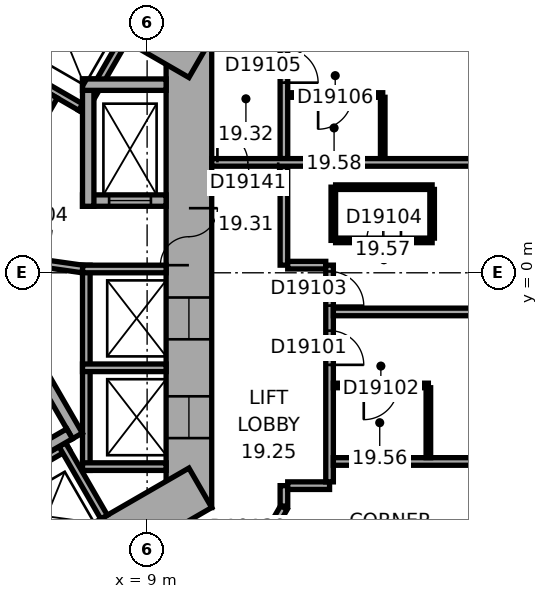
"""IFC4 building model, lengths in metres.
Left out: names, types, materials, properties, quantities, classifications, styles, units other than length and angle.
Written with IfcOpenShell. Run it as: python <this file> out.ifc"""

import sys

from ifc_helpers import new_model, si_unit, direction, frame, frame_2d, origin, place, context, subcontext, project, spatial, rectangle, extrude, element, fill, save


model = new_model("IFC4")
c1 = context("Model", 3, precision=1e-05, world=origin(), true_north=direction((0.0, 1.0)))
c2 = subcontext(c1, "Body", "Model", "MODEL_VIEW")
j1 = project(units=[si_unit("LENGTHUNIT", "METRE"), si_unit("PLANEANGLEUNIT", "RADIAN")], contexts=[c1])
p1 = place(None, origin())
s1 = spatial("IfcSite", under=j1, at=p1, CompositionType="ELEMENT")
p2 = place(p1, origin())
s2 = spatial("IfcBuilding", under=s1, at=p2, CompositionType="ELEMENT")
p3 = place(p2, frame((0.0, 0.0, 86.9)))
s3 = spatial("IfcBuildingStorey", under=s2, at=p3, CompositionType="ELEMENT", Elevation=86.9)
p4 = place(p3, frame((10.1, -6.177, 0.0), z_axis=(0.0, 0.0, 1.0), x_axis=(0.0, 1.0, 0.0)))
e1 = element("IfcWall", 1, at=p4, inside=s3, PredefinedType="SHEAR", context=c2, shape_type="SweptSolid", body=[
    extrude(rectangle(XDim=12.355, YDim=1.2, at=frame_2d((6.177, 0.0))), origin(), (0.0, 0.0, 1.0), 3.3),
])
p5 = place(p4, frame((6.378, 0.0, 0.0)))
e2 = element("IfcOpeningElement", 2, at=p5, cuts=e1, PredefinedType="OPENING", context=c2, shape_type="SweptSolid", body=[
    extrude(rectangle(XDim=1.5, YDim=2.1, at=frame_2d((0.75, 1.05))), frame((0.0, 0.61, 0.0), z_axis=(0.0, -1.0, 0.0), x_axis=(1.0, 0.0, 0.0)), (0.0, 0.0, 1.0), 1.22),
])
p6 = place(p4, frame((1.828, 0.0, 0.0)))
e3 = element("IfcOpeningElement", 3, at=p6, cuts=e1, PredefinedType="OPENING", context=c2, shape_type="SweptSolid", body=[
    extrude(rectangle(XDim=1.1, YDim=2.1, at=frame_2d((0.55, 1.05))), frame((0.0, 0.61, 0.0), z_axis=(0.0, -1.0, 0.0), x_axis=(1.0, 0.0, 0.0)), (0.0, 0.0, 1.0), 1.22),
])
p7 = place(p4, frame((4.427, 0.0, 0.0)))
e4 = element("IfcOpeningElement", 4, at=p7, cuts=e1, PredefinedType="OPENING", context=c2, shape_type="SweptSolid", body=[
    extrude(rectangle(XDim=1.1, YDim=2.1, at=frame_2d((0.55, 1.05))), frame((0.0, 0.61, 0.0), z_axis=(0.0, -1.0, 0.0), x_axis=(1.0, 0.0, 0.0)), (0.0, 0.0, 1.0), 1.22),
])
p8 = place(p3, frame((10.4, 5.658, 0.0), z_axis=(0.0, 0.0, 1.0), x_axis=(-0.866021384402, 0.500006961711, 0.0)))
e5 = element("IfcWall", 5, at=p8, inside=s3, PredefinedType="SHEAR", context=c2, shape_type="SweptSolid", body=[
    extrude(rectangle(XDim=12.355, YDim=1.2, at=frame_2d((6.178, 0.0))), origin(), (0.0, 0.0, 1.0), 3.3),
])
p9 = place(p8, frame((2.728, 0.0, 0.0)))
e6 = element("IfcOpeningElement", 6, at=p9, cuts=e5, PredefinedType="OPENING", context=c2, shape_type="SweptSolid", body=[
    extrude(rectangle(XDim=1.1, YDim=2.1, at=frame_2d((0.55, 1.05))), frame((0.0, 0.61, 0.0), z_axis=(0.0, -1.0, 0.0), x_axis=(1.0, 0.0, 0.0)), (0.0, 0.0, 1.0), 1.22),
])
p10 = place(p8, frame((5.328, 0.0, 0.0)))
e7 = element("IfcOpeningElement", 7, at=p10, cuts=e5, PredefinedType="OPENING", context=c2, shape_type="SweptSolid", body=[
    extrude(rectangle(XDim=1.1, YDim=2.1, at=frame_2d((0.55, 1.05))), frame((0.0, 0.61, 0.0), z_axis=(0.0, -1.0, 0.0), x_axis=(1.0, 0.0, 0.0)), (0.0, 0.0, 1.0), 1.22),
])
p11 = place(p8, frame((7.928, 0.0, 0.0)))
e8 = element("IfcOpeningElement", 8, at=p11, cuts=e5, PredefinedType="OPENING", context=c2, shape_type="SweptSolid", body=[
    extrude(rectangle(XDim=1.1, YDim=2.1, at=frame_2d((0.55, 1.05))), frame((0.0, 0.61, 0.0), z_axis=(0.0, -1.0, 0.0), x_axis=(1.0, 0.0, 0.0)), (0.0, 0.0, 1.0), 1.22),
])
p12 = place(p3, frame((-0.3, -11.836, 0.0), z_axis=(0.0, 0.0, 1.0), x_axis=(0.866021384402, 0.500006961711, 0.0)))
e9 = element("IfcWall", 9, at=p12, inside=s3, PredefinedType="SHEAR", context=c2, shape_type="SweptSolid", body=[
    extrude(rectangle(XDim=12.355, YDim=1.2, at=frame_2d((6.178, 0.0))), origin(), (0.0, 0.0, 1.0), 3.3),
])
p13 = place(p12, frame((4.128, 0.0, 0.0)))
e10 = element("IfcOpeningElement", 10, at=p13, cuts=e9, PredefinedType="OPENING", context=c2, shape_type="SweptSolid", body=[
    extrude(rectangle(XDim=0.9, YDim=2.1, at=frame_2d((0.45, 1.05))), frame((0.0, 0.61, 0.0), z_axis=(0.0, -1.0, 0.0), x_axis=(1.0, 0.0, 0.0)), (0.0, 0.0, 1.0), 1.22),
])
p14 = place(p12, frame((7.928, 0.0, 0.0)))
e11 = element("IfcOpeningElement", 11, at=p14, cuts=e9, PredefinedType="OPENING", context=c2, shape_type="SweptSolid", body=[
    extrude(rectangle(XDim=1.1, YDim=2.1, at=frame_2d((0.55, 1.05))), frame((0.0, 0.61, 0.0), z_axis=(0.0, -1.0, 0.0), x_axis=(1.0, 0.0, 0.0)), (0.0, 0.0, 1.0), 1.22),
])
p15 = place(p3, frame((7.4, -5.2, 0.0), z_axis=(0.0, 0.0, 1.0), x_axis=(0.0, 1.0, 0.0)))
e12 = element("IfcWall", 12, at=p15, inside=s3, PredefinedType="PARTITIONING", context=c2, shape_type="SweptSolid", body=[
    extrude(rectangle(XDim=5.4, YDim=0.2, at=frame_2d((2.7, 0.0))), origin(), (0.0, 0.0, 1.0), 3.05),
])
for number, where, z_axis, x_axis in (
    (13, (7.3, -5.1, 0.0), (0.0, 0.0, 1.0), (1.0, 0.0, 0.0)),
    (14, (7.3, -2.5, 0.0), (0.0, 0.0, 1.0), (1.0, 0.0, 0.0)),
    (15, (7.3, 0.1, 0.0), (0.0, 0.0, 1.0), (1.0, 0.0, 0.0)),
):
    element("IfcWall", number, at=place(p3, frame(where, z_axis=z_axis, x_axis=x_axis)), inside=s3, PredefinedType="PARTITIONING", context=c2, shape_type="SweptSolid", body=[
        extrude(rectangle(XDim=2.2, YDim=0.2, at=frame_2d((1.1, 0.0))), origin(), (0.0, 0.0, 1.0), 3.05),
    ])
p16 = place(p3, frame((7.424, 4.259, 0.0), z_axis=(0.0, 0.0, 1.0), x_axis=(-0.866026010844, 0.49999894854, 0.0)))
e16 = element("IfcWall", 16, at=p16, inside=s3, PredefinedType="PARTITIONING", context=c2, shape_type="SweptSolid", body=[
    extrude(rectangle(XDim=8.0, YDim=0.2, at=frame_2d((4.0, 0.0))), origin(), (0.0, 0.0, 1.0), 3.05),
])
p17 = place(p3, frame((7.287, 4.222, 0.0), z_axis=(0.0, 0.0, 1.0), x_axis=(0.499946605688, 0.86605622881, 0.0)))
e17 = element("IfcWall", 17, at=p17, inside=s3, PredefinedType="PARTITIONING", context=c2, shape_type="SweptSolid", body=[
    extrude(rectangle(XDim=2.2, YDim=0.2, at=frame_2d((1.1, 0.0))), origin(), (0.0, 0.0, 1.0), 3.05),
])
p18 = place(p3, frame((-0.024, -8.559, 0.0), z_axis=(0.0, 0.0, 1.0), x_axis=(0.866026010844, 0.49999894854, 0.0)))
e18 = element("IfcWall", 18, at=p18, inside=s3, PredefinedType="PARTITIONING", context=c2, shape_type="SweptSolid", body=[
    extrude(rectangle(XDim=8.0, YDim=0.2, at=frame_2d((4.0, 0.0))), origin(), (0.0, 0.0, 1.0), 3.05),
])
p19 = place(p3, frame((6.768, -4.522, 0.0), z_axis=(0.0, 0.0, 1.0), x_axis=(0.50002983664, -0.866008176907, 0.0)))
e19 = element("IfcWall", 19, at=p19, inside=s3, PredefinedType="PARTITIONING", context=c2, shape_type="SweptSolid", body=[
    extrude(rectangle(XDim=2.2, YDim=0.2, at=frame_2d((1.1, 0.0))), origin(), (0.0, 0.0, 1.0), 3.05),
])
p20 = place(p3, frame((4.158, 0.602, 0.0), z_axis=(0.0, 0.0, 1.0), x_axis=(0.499977259774, 0.866038532462, 0.0)))
e20 = element("IfcWall", 20, at=p20, inside=s3, PredefinedType="SHEAR", context=c2, shape_type="SweptSolid", body=[
    extrude(rectangle(XDim=4.7, YDim=0.3, at=frame_2d((2.35, 0.0))), origin(), (0.0, 0.0, 1.0), 3.05),
])
p21 = place(p20, frame((0.8, 0.0, 0.0)))
e21 = element("IfcOpeningElement", 21, at=p21, cuts=e20, PredefinedType="OPENING", context=c2, shape_type="SweptSolid", body=[
    extrude(rectangle(XDim=1.2, YDim=2.1, at=frame_2d((0.6, 1.05))), frame((0.0, 0.16, 0.0), z_axis=(0.0, -1.0, 0.0), x_axis=(1.0, 0.0, 0.0)), (0.0, 0.0, 1.0), 0.32),
])
p22 = place(p3, frame((4.816, -0.222, 0.0), z_axis=(0.0, 0.0, 1.0), x_axis=(0.499977259774, -0.866038532462, 0.0)))
e22 = element("IfcWall", 22, at=p22, inside=s3, PredefinedType="SHEAR", context=c2, shape_type="SweptSolid", body=[
    extrude(rectangle(XDim=4.7, YDim=0.3, at=frame_2d((2.35, 0.0))), origin(), (0.0, 0.0, 1.0), 3.05),
])
p23 = place(p3, frame((0.847, -7.767, 0.0), z_axis=(0.0, 0.0, 1.0), x_axis=(0.866027801685, 0.499995846692, 0.0)))
e23 = element("IfcWall", 23, at=p23, inside=s3, PredefinedType="SHEAR", context=c2, shape_type="SweptSolid", body=[
    extrude(rectangle(XDim=7.06, YDim=0.3, at=frame_2d((3.53, 0.0))), origin(), (0.0, 0.0, 1.0), 3.05),
])
p24 = place(p3, frame((7.3, 1.9, 0.0), z_axis=(0.0, 0.0, 1.0), x_axis=(1.0, 0.0, 0.0)))
e24 = element("IfcWall", 24, at=p24, inside=s3, PredefinedType="SHEAR", context=c2, shape_type="SweptSolid", body=[
    extrude(rectangle(XDim=2.2, YDim=0.3, at=frame_2d((1.1, 0.0))), origin(), (0.0, 0.0, 1.0), 3.05),
])
p25 = place(p24, frame((0.7, 0.0, 0.0)))
e25 = element("IfcOpeningElement", 25, at=p25, cuts=e24, PredefinedType="OPENING", context=c2, shape_type="SweptSolid", body=[
    extrude(rectangle(XDim=1.1, YDim=2.1, at=frame_2d((0.55, 1.05))), frame((0.0, 0.16, 0.0), z_axis=(0.0, -1.0, 0.0), x_axis=(1.0, 0.0, 0.0)), (0.0, 0.0, 1.0), 0.32),
])
p26 = place(p3, frame((7.45, 1.75, 0.0), z_axis=(0.0, 0.0, 1.0), x_axis=(0.0, 1.0, 0.0)))
e26 = element("IfcWall", 26, at=p26, inside=s3, PredefinedType="SHEAR", context=c2, shape_type="SweptSolid", body=[
    extrude(rectangle(XDim=3.35, YDim=0.3, at=frame_2d((1.675, 0.0))), origin(), (0.0, 0.0, 1.0), 3.05),
])
p27 = place(p3, frame((7.3, 4.95, 0.0), z_axis=(0.0, 0.0, 1.0), x_axis=(1.0, 0.0, 0.0)))
e27 = element("IfcWall", 27, at=p27, inside=s3, PredefinedType="SHEAR", context=c2, shape_type="SweptSolid", body=[
    extrude(rectangle(XDim=2.2, YDim=0.3, at=frame_2d((1.1, 0.0))), origin(), (0.0, 0.0, 1.0), 3.05),
])
p28 = place(p3, frame((4.327, 0.521, 0.0), z_axis=(0.0, 0.0, 1.0), x_axis=(0.990124376366, -0.14019172346, 0.0)))
e28 = element("IfcWall", 28, at=p28, inside=s3, PredefinedType="PARTITIONING", context=c2, shape_type="SweptSolid", body=[
    extrude(rectangle(XDim=3.002, YDim=0.2, at=frame_2d((1.501, 0.0))), origin(), (0.0, 0.0, 1.0), 3.05),
])
p29 = place(p28, frame((1.15, 0.0, 0.0)))
e29 = element("IfcOpeningElement", 29, at=p29, cuts=e28, PredefinedType="OPENING", context=c2, shape_type="SweptSolid", body=[
    extrude(rectangle(XDim=0.9, YDim=2.1, at=frame_2d((0.45, 1.05))), frame((0.0, 0.11, 0.0), z_axis=(0.0, -1.0, 0.0), x_axis=(1.0, 0.0, 0.0)), (0.0, 0.0, 1.0), 0.22),
])
p30 = place(p3, frame((11.67, -7.788, 0.0), z_axis=(0.0, 0.0, 1.0), x_axis=(0.500063286585, 0.865988862174, 0.0)))
e30 = element("IfcWall", 30, at=p30, inside=s3, PredefinedType="PARTITIONING", context=c2, shape_type="SweptSolid", body=[
    extrude(rectangle(XDim=1.86, YDim=0.2, at=frame_2d((0.93, 0.0))), origin(), (0.0, 0.0, 1.0), 3.05),
])
p31 = place(p30, frame((0.43, 0.0, 0.0)))
e31 = element("IfcOpeningElement", 31, at=p31, cuts=e30, PredefinedType="OPENING", context=c2, shape_type="SweptSolid", body=[
    extrude(rectangle(XDim=1.0, YDim=2.1, at=frame_2d((0.5, 1.05))), frame((0.0, 0.11, 0.0), z_axis=(0.0, -1.0, 0.0), x_axis=(1.0, 0.0, 0.0)), (0.0, 0.0, 1.0), 0.22),
])
p32 = place(p3, frame((12.6, -6.138, 0.0), z_axis=(0.0, 0.0, 1.0), x_axis=(0.0, 1.0, 0.0)))
e32 = element("IfcWall", 32, at=p32, inside=s3, PredefinedType="PARTITIONING", context=c2, shape_type="SweptSolid", body=[
    extrude(rectangle(XDim=0.537, YDim=0.2, at=frame_2d((0.268, 0.0))), origin(), (0.0, 0.0, 1.0), 3.05),
])
p33 = place(p3, frame((12.6, 0.201, 0.0), z_axis=(0.0, 0.0, 1.0), x_axis=(0.0, 1.0, 0.0)))
e33 = element("IfcWall", 33, at=p33, inside=s3, PredefinedType="PARTITIONING", context=c2, shape_type="SweptSolid", body=[
    extrude(rectangle(XDim=2.604, YDim=0.2, at=frame_2d((1.302, 0.0))), origin(), (0.0, 0.0, 1.0), 3.05),
])
p34 = place(p3, frame((12.6, 3.004, 0.0), z_axis=(0.0, 0.0, 1.0), x_axis=(0.0, 1.0, 0.0)))
e34 = element("IfcWall", 34, at=p34, inside=s3, PredefinedType="PARTITIONING", context=c2, shape_type="SweptSolid", body=[
    extrude(rectangle(XDim=3.173, YDim=0.2, at=frame_2d((1.586, 0.0))), origin(), (0.0, 0.0, 1.0), 3.05),
])
p35 = place(p34, frame((1.998, 0.0, 0.0)))
e35 = element("IfcOpeningElement", 35, at=p35, cuts=e34, PredefinedType="OPENING", context=c2, shape_type="SweptSolid", body=[
    extrude(rectangle(XDim=0.9, YDim=2.1, at=frame_2d((0.45, 1.05))), frame((0.0, 0.11, 0.0), z_axis=(0.0, -1.0, 0.0), x_axis=(1.0, 0.0, 0.0)), (0.0, 0.0, 1.0), 0.22),
])
p36 = place(p3, frame((12.7, -5.601, 0.0), z_axis=(0.0, 0.0, 1.0), x_axis=(1.0, 0.0, 0.0)))
e36 = element("IfcWall", 36, at=p36, inside=s3, PredefinedType="PARTITIONING", context=c2, shape_type="SweptSolid", body=[
    extrude(rectangle(XDim=1.101, YDim=0.2, at=frame_2d((0.551, 0.0))), origin(), (0.0, 0.0, 1.0), 3.05),
])
p37 = place(p3, frame((12.7, 4.677, 0.0), z_axis=(0.0, 0.0, 1.0), x_axis=(1.0, 0.0, 0.0)))
e37 = element("IfcWall", 37, at=p37, inside=s3, PredefinedType="PARTITIONING", context=c2, shape_type="SweptSolid", body=[
    extrude(rectangle(XDim=2.5, YDim=0.12, at=frame_2d((1.25, 0.0))), origin(), (0.0, 0.0, 1.0), 3.05),
])
p38 = place(p37, frame((0.8, 0.0, 0.0)))
e38 = element("IfcOpeningElement", 38, at=p38, cuts=e37, PredefinedType="OPENING", context=c2, shape_type="SweptSolid", body=[
    extrude(rectangle(XDim=0.9, YDim=2.1, at=frame_2d((0.45, 1.05))), frame((0.0, 0.07, 0.0), z_axis=(0.0, -1.0, 0.0), x_axis=(1.0, 0.0, 0.0)), (0.0, 0.0, 1.0), 0.14),
])
p39 = place(p3, frame((13.701, 0.201, 0.0), z_axis=(0.0, 0.0, 1.0), x_axis=(-1.0, 0.0, 0.0)))
e39 = element("IfcWall", 39, at=p39, inside=s3, PredefinedType="PARTITIONING", context=c2, shape_type="SweptSolid", body=[
    extrude(rectangle(XDim=1.001, YDim=0.2, at=frame_2d((0.5, 0.0))), origin(), (0.0, 0.0, 1.0), 3.05),
])
p40 = place(p3, frame((13.801, -5.501, 0.0), z_axis=(0.0, 0.0, 1.0), x_axis=(0.0, 1.0, 0.0)))
e40 = element("IfcWall", 40, at=p40, inside=s3, PredefinedType="PARTITIONING", context=c2, shape_type="SweptSolid", body=[
    extrude(rectangle(XDim=5.702, YDim=0.2, at=frame_2d((2.851, 0.0))), origin(), (0.0, 0.0, 1.0), 3.05),
])
p41 = place(p40, frame((3.079, 0.0, 0.0)))
e41 = element("IfcOpeningElement", 41, at=p41, cuts=e40, PredefinedType="OPENING", context=c2, shape_type="SweptSolid", body=[
    extrude(rectangle(XDim=0.9, YDim=2.1, at=frame_2d((0.45, 1.05))), frame((0.0, 0.11, 0.0), z_axis=(0.0, -1.0, 0.0), x_axis=(1.0, 0.0, 0.0)), (0.0, 0.0, 1.0), 0.22),
])
p42 = place(p40, frame((4.636, 0.0, 0.0)))
e42 = element("IfcOpeningElement", 42, at=p42, cuts=e40, PredefinedType="OPENING", context=c2, shape_type="SweptSolid", body=[
    extrude(rectangle(XDim=0.9, YDim=2.1, at=frame_2d((0.45, 1.05))), frame((0.0, 0.11, 0.0), z_axis=(0.0, -1.0, 0.0), x_axis=(1.0, 0.0, 0.0)), (0.0, 0.0, 1.0), 0.22),
])
p43 = place(p3, frame((13.901, -4.965, 0.0), z_axis=(0.0, 0.0, 1.0), x_axis=(1.0, 0.0, 0.0)))
e43 = element("IfcWall", 43, at=p43, inside=s3, PredefinedType="PARTITIONING", context=c2, shape_type="SweptSolid", body=[
    extrude(rectangle(XDim=8.049, YDim=0.2, at=frame_2d((4.024, 0.0))), origin(), (0.0, 0.0, 1.0), 3.05),
])
p44 = place(p3, frame((13.901, -2.965, 0.0), z_axis=(0.0, 0.0, 1.0), x_axis=(1.0, 0.0, 0.0)))
e44 = element("IfcWall", 44, at=p44, inside=s3, PredefinedType="PARTITIONING", context=c2, shape_type="SweptSolid", body=[
    extrude(rectangle(XDim=2.5, YDim=0.12, at=frame_2d((1.25, 0.0))), origin(), (0.0, 0.0, 1.0), 3.05),
])
p45 = place(p44, frame((0.8, 0.0, 0.0)))
e45 = element("IfcOpeningElement", 45, at=p45, cuts=e44, PredefinedType="OPENING", context=c2, shape_type="SweptSolid", body=[
    extrude(rectangle(XDim=0.9, YDim=2.1, at=frame_2d((0.45, 1.05))), frame((0.0, 0.07, 0.0), z_axis=(0.0, -1.0, 0.0), x_axis=(1.0, 0.0, 0.0)), (0.0, 0.0, 1.0), 0.14),
])
p46 = place(p3, frame((13.9, 0.853, 0.0), z_axis=(0.0, 0.0, 1.0), x_axis=(0.0, 1.0, 0.0)))
e46 = element("IfcWall", 46, at=p46, inside=s3, PredefinedType="PARTITIONING", context=c2, shape_type="SweptSolid", body=[
    extrude(rectangle(XDim=1.4, YDim=0.12, at=frame_2d((0.7, 0.0))), origin(), (0.0, 0.0, 1.0), 3.05),
])
p47 = place(p3, frame((13.96, 2.253, 0.0), z_axis=(0.0, 0.0, 1.0), x_axis=(1.0, 0.0, 0.0)))
e47 = element("IfcWall", 47, at=p47, inside=s3, PredefinedType="PARTITIONING", context=c2, shape_type="SweptSolid", body=[
    extrude(rectangle(XDim=2.54, YDim=0.12, at=frame_2d((1.27, 0.0))), origin(), (0.0, 0.0, 1.0), 3.05),
])
p48 = place(p3, frame((15.2, 4.618, 0.0), z_axis=(0.0, 0.0, 1.0), x_axis=(0.0, -1.0, 0.0)))
e48 = element("IfcWall", 48, at=p48, inside=s3, PredefinedType="PARTITIONING", context=c2, shape_type="SweptSolid", body=[
    extrude(rectangle(XDim=1.613, YDim=0.12, at=frame_2d((0.807, 0.0))), origin(), (0.0, 0.0, 1.0), 3.05),
])
p49 = place(p3, frame((16.401, -3.025, 0.0), z_axis=(0.0, 0.0, 1.0), x_axis=(0.0, -1.0, 0.0)))
e49 = element("IfcWall", 49, at=p49, inside=s3, PredefinedType="PARTITIONING", context=c2, shape_type="SweptSolid", body=[
    extrude(rectangle(XDim=1.84, YDim=0.12, at=frame_2d((0.92, 0.0))), origin(), (0.0, 0.0, 1.0), 3.05),
])
p50 = place(p3, frame((16.5, 0.853, 0.0), z_axis=(0.0, 0.0, 1.0), x_axis=(-1.0, 0.0, 0.0)))
e50 = element("IfcWall", 50, at=p50, inside=s3, PredefinedType="PARTITIONING", context=c2, shape_type="SweptSolid", body=[
    extrude(rectangle(XDim=2.54, YDim=0.12, at=frame_2d((1.27, 0.0))), origin(), (0.0, 0.0, 1.0), 3.05),
])
p51 = place(p50, frame((0.82, 0.0, 0.0)))
e51 = element("IfcOpeningElement", 51, at=p51, cuts=e50, PredefinedType="OPENING", context=c2, shape_type="SweptSolid", body=[
    extrude(rectangle(XDim=0.9, YDim=2.1, at=frame_2d((0.45, 1.05))), frame((0.0, 0.07, 0.0), z_axis=(0.0, -1.0, 0.0), x_axis=(1.0, 0.0, 0.0)), (0.0, 0.0, 1.0), 0.14),
])
p52 = place(p3, frame((16.5, 2.193, 0.0), z_axis=(0.0, 0.0, 1.0), x_axis=(0.0, -1.0, 0.0)))
e52 = element("IfcWall", 52, at=p52, inside=s3, PredefinedType="PARTITIONING", context=c2, shape_type="SweptSolid", body=[
    extrude(rectangle(XDim=1.28, YDim=0.12, at=frame_2d((0.64, 0.0))), origin(), (0.0, 0.0, 1.0), 3.05),
])
p53 = place(p3, frame((21.95, -1.03, 0.0), z_axis=(0.0, 0.0, 1.0), x_axis=(-1.0, 0.0, 0.0)))
e53 = element("IfcWall", 53, at=p53, inside=s3, PredefinedType="PARTITIONING", context=c2, shape_type="SweptSolid", body=[
    extrude(rectangle(XDim=8.049, YDim=0.2, at=frame_2d((4.024, 0.0))), origin(), (0.0, 0.0, 1.0), 2.6),
])
p54 = place(p3, frame((21.95, 2.905, 0.0), z_axis=(0.0, 0.0, 1.0), x_axis=(-1.0, 0.0, 0.0)))
e54 = element("IfcWall", 54, at=p54, inside=s3, PredefinedType="PARTITIONING", context=c2, shape_type="SweptSolid", body=[
    extrude(rectangle(XDim=11.25, YDim=0.2, at=frame_2d((5.625, 0.0))), origin(), (0.0, 0.0, 1.0), 3.05),
])
p55 = place(p54, frame((9.5, 0.0, 0.0)))
e55 = element("IfcOpeningElement", 55, at=p55, cuts=e54, PredefinedType="OPENING", context=c2, shape_type="SweptSolid", body=[
    extrude(rectangle(XDim=1.6, YDim=2.1, at=frame_2d((0.8, 1.05))), frame((0.0, 0.11, 0.0), z_axis=(0.0, -1.0, 0.0), x_axis=(1.0, 0.0, 0.0)), (0.0, 0.0, 1.0), 0.22),
])
p56 = place(p5, origin())
e56 = element("IfcDoor", 56, at=p56, inside=s3, OperationType="DOUBLE_DOOR_SINGLE_SWING", PredefinedType="DOOR", context=c2, shape_type="SweptSolid", body=[
    extrude(rectangle(XDim=1.5, YDim=2.1, at=frame_2d((0.75, 1.05))), frame((0.0, 0.025, 0.0), z_axis=(0.0, -1.0, 0.0), x_axis=(1.0, 0.0, 0.0)), (0.0, 0.0, 1.0), 0.05),
])
fill(e2, e56)
p57 = place(p25, origin())
e57 = element("IfcDoor", 57, at=p57, inside=s3, OperationType="DOUBLE_DOOR_SLIDING", PredefinedType="DOOR", context=c2, shape_type="SweptSolid", body=[
    extrude(rectangle(XDim=1.1, YDim=2.1, at=frame_2d((0.55, 1.05))), frame((0.0, 0.025, 0.0), z_axis=(0.0, -1.0, 0.0), x_axis=(1.0, 0.0, 0.0)), (0.0, 0.0, 1.0), 0.05),
])
fill(e25, e57)
p58 = place(p6, origin())
e58 = element("IfcDoor", 58, at=p58, inside=s3, OperationType="DOUBLE_DOOR_SLIDING", PredefinedType="DOOR", context=c2, shape_type="SweptSolid", body=[
    extrude(rectangle(XDim=1.1, YDim=2.1, at=frame_2d((0.55, 1.05))), frame((0.0, 0.025, 0.0), z_axis=(0.0, -1.0, 0.0), x_axis=(1.0, 0.0, 0.0)), (0.0, 0.0, 1.0), 0.05),
])
fill(e3, e58)
p59 = place(p7, origin())
e59 = element("IfcDoor", 59, at=p59, inside=s3, OperationType="DOUBLE_DOOR_SLIDING", PredefinedType="DOOR", context=c2, shape_type="SweptSolid", body=[
    extrude(rectangle(XDim=1.1, YDim=2.1, at=frame_2d((0.55, 1.05))), frame((0.0, 0.025, 0.0), z_axis=(0.0, -1.0, 0.0), x_axis=(1.0, 0.0, 0.0)), (0.0, 0.0, 1.0), 0.05),
])
fill(e4, e59)
p60 = place(p41, origin())
e60 = element("IfcDoor", 60, at=p60, inside=s3, OperationType="SINGLE_SWING_LEFT", PredefinedType="DOOR", context=c2, shape_type="SweptSolid", body=[
    extrude(rectangle(XDim=0.9, YDim=2.1, at=frame_2d((0.45, 1.05))), frame((0.0, 0.025, 0.0), z_axis=(0.0, -1.0, 0.0), x_axis=(1.0, 0.0, 0.0)), (0.0, 0.0, 1.0), 0.05),
])
fill(e41, e60)
p61 = place(p45, origin())
e61 = element("IfcDoor", 61, at=p61, inside=s3, OperationType="SINGLE_SWING_LEFT", PredefinedType="DOOR", context=c2, shape_type="SweptSolid", body=[
    extrude(rectangle(XDim=0.9, YDim=2.1, at=frame_2d((0.45, 1.05))), frame((0.0, 0.025, 0.0), z_axis=(0.0, -1.0, 0.0), x_axis=(1.0, 0.0, 0.0)), (0.0, 0.0, 1.0), 0.05),
])
fill(e45, e61)
p62 = place(p42, origin())
e62 = element("IfcDoor", 62, at=p62, inside=s3, OperationType="SINGLE_SWING_LEFT", PredefinedType="DOOR", context=c2, shape_type="SweptSolid", body=[
    extrude(rectangle(XDim=0.9, YDim=2.1, at=frame_2d((0.45, 1.05))), frame((0.0, 0.025, 0.0), z_axis=(0.0, -1.0, 0.0), x_axis=(1.0, 0.0, 0.0)), (0.0, 0.0, 1.0), 0.05),
])
fill(e42, e62)
p63 = place(p51, origin())
e63 = element("IfcDoor", 63, at=p63, inside=s3, OperationType="SINGLE_SWING_LEFT", PredefinedType="DOOR", context=c2, shape_type="SweptSolid", body=[
    extrude(rectangle(XDim=0.9, YDim=2.1, at=frame_2d((0.45, 1.05))), frame((0.0, 0.025, 0.0), z_axis=(0.0, -1.0, 0.0), x_axis=(1.0, 0.0, 0.0)), (0.0, 0.0, 1.0), 0.05),
])
fill(e51, e63)
p64 = place(p35, origin())
e64 = element("IfcDoor", 64, at=p64, inside=s3, OperationType="SINGLE_SWING_LEFT", PredefinedType="DOOR", context=c2, shape_type="SweptSolid", body=[
    extrude(rectangle(XDim=0.9, YDim=2.1, at=frame_2d((0.45, 1.05))), frame((0.0, 0.025, 0.0), z_axis=(0.0, -1.0, 0.0), x_axis=(1.0, 0.0, 0.0)), (0.0, 0.0, 1.0), 0.05),
])
fill(e35, e64)
p65 = place(p38, origin())
e65 = element("IfcDoor", 65, at=p65, inside=s3, OperationType="SINGLE_SWING_LEFT", PredefinedType="DOOR", context=c2, shape_type="SweptSolid", body=[
    extrude(rectangle(XDim=0.9, YDim=2.1, at=frame_2d((0.45, 1.05))), frame((0.0, 0.025, 0.0), z_axis=(0.0, -1.0, 0.0), x_axis=(1.0, 0.0, 0.0)), (0.0, 0.0, 1.0), 0.05),
])
fill(e38, e65)
p66 = place(p55, origin())
e66 = element("IfcDoor", 66, at=p66, inside=s3, OperationType="DOUBLE_DOOR_SINGLE_SWING", PredefinedType="DOOR", context=c2, shape_type="SweptSolid", body=[
    extrude(rectangle(XDim=1.6, YDim=2.1, at=frame_2d((0.8, 1.05))), frame((0.0, 0.025, 0.0), z_axis=(0.0, -1.0, 0.0), x_axis=(1.0, 0.0, 0.0)), (0.0, 0.0, 1.0), 0.05),
])
fill(e55, e66)
save(model, sys.argv[1])
